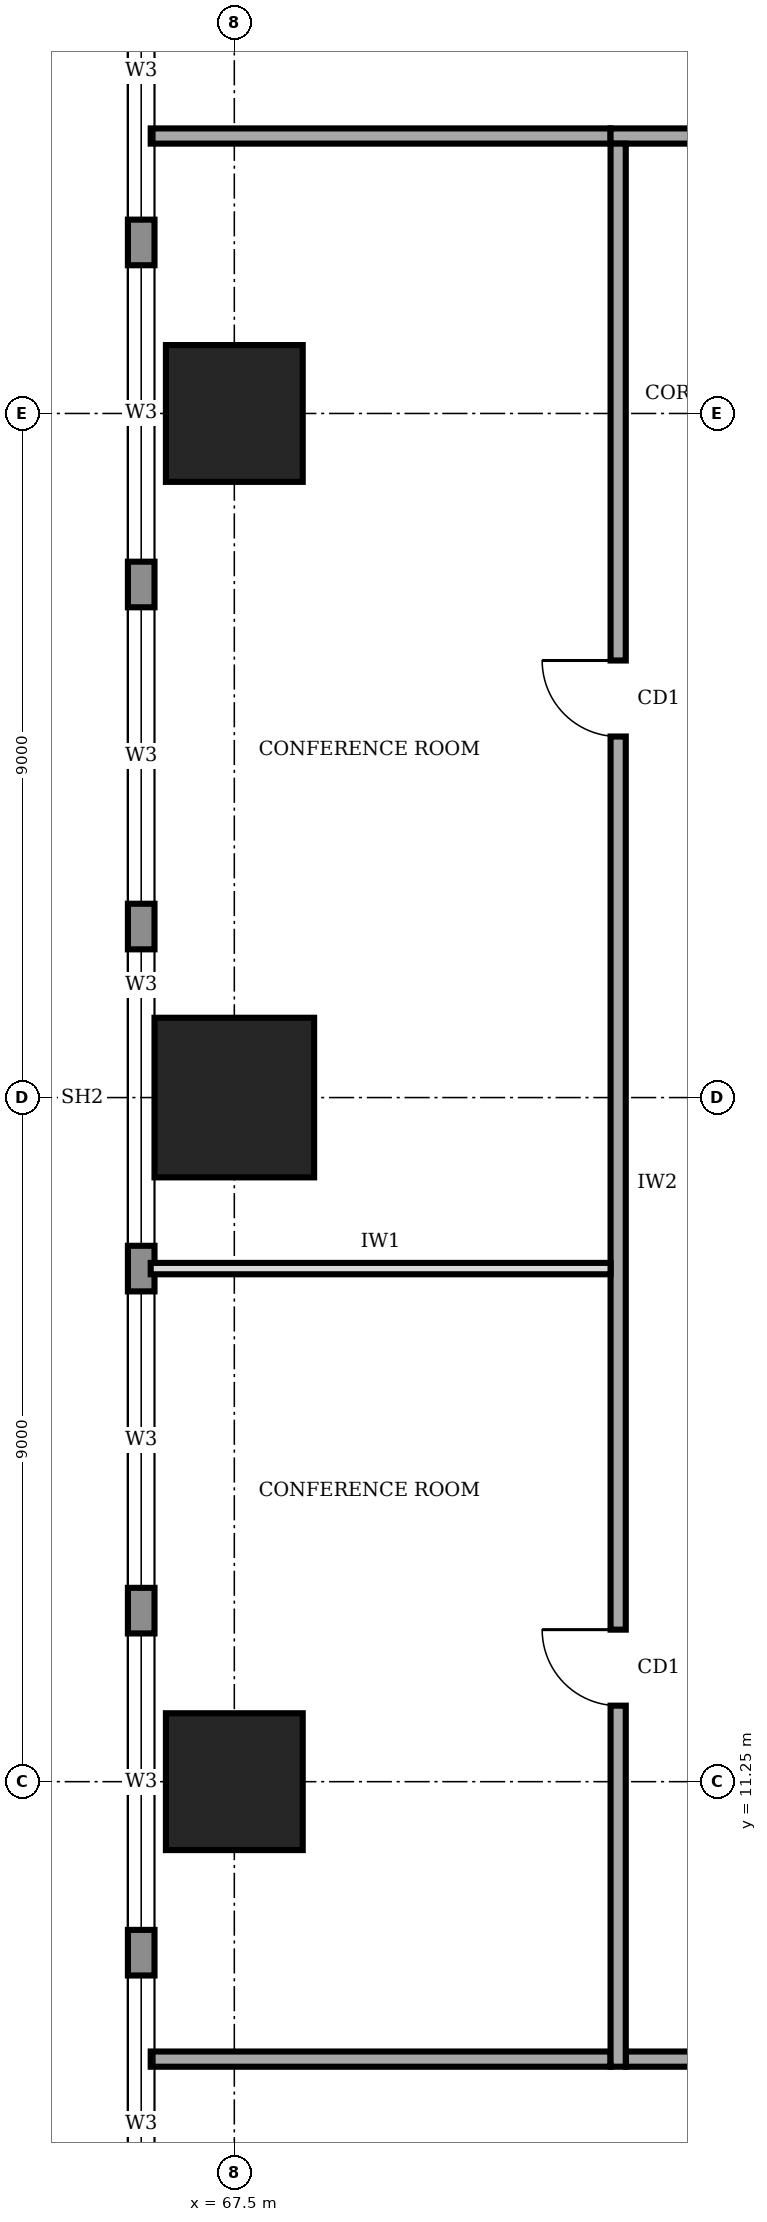
"""IFC4 building model, lengths in metres.
Left out: names, types, materials, properties, quantities, classifications, styles, units other than length and angle.
Written with IfcOpenShell. Run it as: python <this file> out.ifc"""

import sys

from ifc_helpers import new_model, si_unit, direction, frame, frame_2d, origin, origin_2d, place, context, subcontext, project, spatial, rectangle, extrude, element, fill, save


model = new_model("IFC4")
c1 = context("Model", 3, precision=1e-05, world=origin(), true_north=direction((0.0, 1.0)))
c2 = subcontext(c1, "Body", "Model", "MODEL_VIEW")
j1 = project(units=[si_unit("LENGTHUNIT", "METRE"), si_unit("PLANEANGLEUNIT", "RADIAN")], contexts=[c1])
p1 = place(None, origin())
s1 = spatial("IfcSite", under=j1, at=p1, CompositionType="ELEMENT")
p2 = place(p1, origin())
s2 = spatial("IfcBuilding", under=s1, at=p2, CompositionType="ELEMENT")
p3 = place(p2, frame((0.0, 0.0, 189.0)))
s3 = spatial("IfcBuildingStorey", under=s2, at=p3, CompositionType="ELEMENT", Elevation=189.0)
p4 = place(p3, frame((67.5, 11.25, 0.0), z_axis=(0.0, 0.0, 1.0), x_axis=(1.0, 0.0, 0.0)))
e1 = element("IfcColumn", 1, at=p4, inside=s3, PredefinedType="COLUMN", context=c2, shape_type="SweptSolid", body=[
    extrude(rectangle(XDim=1.8, YDim=1.8, at=origin_2d()), origin(), (0.0, 0.0, 1.0), 4.0),
])
p5 = place(p3, frame((67.5, 20.25, 0.0), z_axis=(0.0, 0.0, 1.0), x_axis=(1.0, 0.0, 0.0)))
e2 = element("IfcColumn", 2, at=p5, inside=s3, PredefinedType="COLUMN", context=c2, shape_type="SweptSolid", body=[
    extrude(rectangle(XDim=2.1, YDim=2.1, at=origin_2d()), origin(), (0.0, 0.0, 1.0), 4.0),
])
p6 = place(p3, frame((67.5, 29.25, 0.0), z_axis=(0.0, 0.0, 1.0), x_axis=(1.0, 0.0, 0.0)))
e3 = element("IfcColumn", 3, at=p6, inside=s3, PredefinedType="COLUMN", context=c2, shape_type="SweptSolid", body=[
    extrude(rectangle(XDim=1.8, YDim=1.8, at=origin_2d()), origin(), (0.0, 0.0, 1.0), 4.0),
])
p7 = place(p3, frame((66.275, 37.18, 0.0), z_axis=(0.0, 0.0, 1.0), x_axis=(0.0, -1.0, 0.0)))
e4 = element("IfcWall", 4, at=p7, inside=s3, PredefinedType="STANDARD", context=c2, shape_type="SweptSolid", body=[
    extrude(rectangle(XDim=33.86, YDim=0.35, at=frame_2d((16.93, 0.0))), origin(), (0.0, 0.0, 1.0), 3.75),
])
p8 = place(p7, frame((28.48, 0.0, 0.95)))
e5 = element("IfcOpeningElement", 5, at=p8, cuts=e4, PredefinedType="OPENING", context=c2, shape_type="SweptSolid", body=[
    extrude(rectangle(XDim=3.9, YDim=1.8, at=frame_2d((1.95, 0.9))), frame((0.0, 0.185, 0.0), z_axis=(0.0, -1.0, 0.0), x_axis=(1.0, 0.0, 0.0)), (0.0, 0.0, 1.0), 0.37),
])
p9 = place(p7, frame((23.98, 0.0, 0.95)))
e6 = element("IfcOpeningElement", 6, at=p9, cuts=e4, PredefinedType="OPENING", context=c2, shape_type="SweptSolid", body=[
    extrude(rectangle(XDim=3.9, YDim=1.8, at=frame_2d((1.95, 0.9))), frame((0.0, 0.185, 0.0), z_axis=(0.0, -1.0, 0.0), x_axis=(1.0, 0.0, 0.0)), (0.0, 0.0, 1.0), 0.37),
])
p10 = place(p7, frame((19.48, 0.0, 0.95)))
e7 = element("IfcOpeningElement", 7, at=p10, cuts=e4, PredefinedType="OPENING", context=c2, shape_type="SweptSolid", body=[
    extrude(rectangle(XDim=3.9, YDim=1.8, at=frame_2d((1.95, 0.9))), frame((0.0, 0.185, 0.0), z_axis=(0.0, -1.0, 0.0), x_axis=(1.0, 0.0, 0.0)), (0.0, 0.0, 1.0), 0.37),
])
p11 = place(p7, frame((14.98, 0.0, 0.95)))
e8 = element("IfcOpeningElement", 8, at=p11, cuts=e4, PredefinedType="OPENING", context=c2, shape_type="SweptSolid", body=[
    extrude(rectangle(XDim=3.9, YDim=1.8, at=frame_2d((1.95, 0.9))), frame((0.0, 0.185, 0.0), z_axis=(0.0, -1.0, 0.0), x_axis=(1.0, 0.0, 0.0)), (0.0, 0.0, 1.0), 0.37),
])
p12 = place(p7, frame((10.48, 0.0, 0.95)))
e9 = element("IfcOpeningElement", 9, at=p12, cuts=e4, PredefinedType="OPENING", context=c2, shape_type="SweptSolid", body=[
    extrude(rectangle(XDim=3.9, YDim=1.8, at=frame_2d((1.95, 0.9))), frame((0.0, 0.185, 0.0), z_axis=(0.0, -1.0, 0.0), x_axis=(1.0, 0.0, 0.0)), (0.0, 0.0, 1.0), 0.37),
])
p13 = place(p7, frame((5.98, 0.0, 0.95)))
e10 = element("IfcOpeningElement", 10, at=p13, cuts=e4, PredefinedType="OPENING", context=c2, shape_type="SweptSolid", body=[
    extrude(rectangle(XDim=3.9, YDim=1.8, at=frame_2d((1.95, 0.9))), frame((0.0, 0.185, 0.0), z_axis=(0.0, -1.0, 0.0), x_axis=(1.0, 0.0, 0.0)), (0.0, 0.0, 1.0), 0.37),
])
p14 = place(p7, frame((1.48, 0.0, 0.95)))
e11 = element("IfcOpeningElement", 11, at=p14, cuts=e4, PredefinedType="OPENING", context=c2, shape_type="SweptSolid", body=[
    extrude(rectangle(XDim=3.9, YDim=1.8, at=frame_2d((1.95, 0.9))), frame((0.0, 0.185, 0.0), z_axis=(0.0, -1.0, 0.0), x_axis=(1.0, 0.0, 0.0)), (0.0, 0.0, 1.0), 0.37),
])
p15 = place(p3, frame((72.65, 7.6, 0.0), z_axis=(0.0, 0.0, 1.0), x_axis=(1.0, 0.0, 0.0)))
e12 = element("IfcWall", 12, at=p15, inside=s3, PredefinedType="SOLIDWALL", context=c2, shape_type="SweptSolid", body=[
    extrude(rectangle(XDim=16.9, YDim=0.2, at=frame_2d((8.45, 0.0))), origin(), (0.0, 0.0, 1.0), 3.75),
])
p16 = place(p15, frame((3.575, 0.0, 0.0)))
e13 = element("IfcOpeningElement", 13, at=p16, cuts=e12, PredefinedType="OPENING", context=c2, shape_type="SweptSolid", body=[
    extrude(rectangle(XDim=1.0, YDim=2.1, at=frame_2d((0.5, 1.05))), frame((0.0, 0.11, 0.0), z_axis=(0.0, -1.0, 0.0), x_axis=(1.0, 0.0, 0.0)), (0.0, 0.0, 1.0), 0.22),
])
p17 = place(p3, frame((89.35, 32.9, 0.0), z_axis=(0.0, 0.0, 1.0), x_axis=(-1.0, 0.0, 0.0)))
e14 = element("IfcWall", 14, at=p17, inside=s3, PredefinedType="SOLIDWALL", context=c2, shape_type="SweptSolid", body=[
    extrude(rectangle(XDim=16.9, YDim=0.2, at=frame_2d((8.45, 0.0))), origin(), (0.0, 0.0, 1.0), 3.75),
])
p18 = place(p17, frame((14.375, 0.0, 0.0)))
e15 = element("IfcOpeningElement", 15, at=p18, cuts=e14, PredefinedType="OPENING", context=c2, shape_type="SweptSolid", body=[
    extrude(rectangle(XDim=1.0, YDim=2.1, at=frame_2d((0.5, 1.05))), frame((0.0, 0.11, 0.0), z_axis=(0.0, -1.0, 0.0), x_axis=(1.0, 0.0, 0.0)), (0.0, 0.0, 1.0), 0.22),
])
p19 = place(p3, frame((72.55, 32.8, 0.0), z_axis=(0.0, 0.0, 1.0), x_axis=(0.0, -1.0, 0.0)))
e16 = element("IfcWall", 16, at=p19, inside=s3, PredefinedType="SOLIDWALL", context=c2, shape_type="SweptSolid", body=[
    extrude(rectangle(XDim=25.3, YDim=0.2, at=frame_2d((12.65, 0.0))), origin(), (0.0, 0.0, 1.0), 3.75),
])
p20 = place(p19, frame((19.55, 0.0, 0.0)))
e17 = element("IfcOpeningElement", 17, at=p20, cuts=e16, PredefinedType="OPENING", context=c2, shape_type="SweptSolid", body=[
    extrude(rectangle(XDim=1.0, YDim=2.1, at=frame_2d((0.5, 1.05))), frame((0.0, 0.11, 0.0), z_axis=(0.0, -1.0, 0.0), x_axis=(1.0, 0.0, 0.0)), (0.0, 0.0, 1.0), 0.22),
])
p21 = place(p19, frame((6.8, 0.0, 0.0)))
e18 = element("IfcOpeningElement", 18, at=p21, cuts=e16, PredefinedType="OPENING", context=c2, shape_type="SweptSolid", body=[
    extrude(rectangle(XDim=1.0, YDim=2.1, at=frame_2d((0.5, 1.05))), frame((0.0, 0.11, 0.0), z_axis=(0.0, -1.0, 0.0), x_axis=(1.0, 0.0, 0.0)), (0.0, 0.0, 1.0), 0.22),
])
for number, where, z_axis, x_axis in (
    (19, (66.4, 7.6, 0.0), (0.0, 0.0, 1.0), (1.0, 0.0, 0.0)),
    (20, (66.4, 32.9, 0.0), (0.0, 0.0, 1.0), (1.0, 0.0, 0.0)),
):
    element("IfcWall", number, at=place(p3, frame(where, z_axis=z_axis, x_axis=x_axis)), inside=s3, PredefinedType="SOLIDWALL", context=c2, shape_type="SweptSolid", body=[
        extrude(rectangle(XDim=6.05, YDim=0.2, at=frame_2d((3.025, 0.0))), origin(), (0.0, 0.0, 1.0), 3.75),
    ])
p22 = place(p3, frame((66.4, 18.0, 0.0), z_axis=(0.0, 0.0, 1.0), x_axis=(1.0, 0.0, 0.0)))
e21 = element("IfcWall", 21, at=p22, inside=s3, PredefinedType="PARTITIONING", context=c2, shape_type="SweptSolid", body=[
    extrude(rectangle(XDim=6.05, YDim=0.15, at=frame_2d((3.025, 0.0))), origin(), (0.0, 0.0, 1.0), 3.75),
])
p23 = place(p8, origin())
e22 = element("IfcWindow", 22, at=p23, inside=s3, PartitioningType="SINGLE_PANEL", PredefinedType="WINDOW", context=c2, shape_type="SweptSolid", body=[
    extrude(rectangle(XDim=3.9, YDim=1.8, at=frame_2d((1.95, 0.9))), frame((0.0, 0.03, 0.0), z_axis=(0.0, -1.0, 0.0), x_axis=(1.0, 0.0, 0.0)), (0.0, 0.0, 1.0), 0.06),
])
fill(e5, e22)
p24 = place(p9, origin())
e23 = element("IfcWindow", 23, at=p24, inside=s3, PartitioningType="SINGLE_PANEL", PredefinedType="WINDOW", context=c2, shape_type="SweptSolid", body=[
    extrude(rectangle(XDim=3.9, YDim=1.8, at=frame_2d((1.95, 0.9))), frame((0.0, 0.03, 0.0), z_axis=(0.0, -1.0, 0.0), x_axis=(1.0, 0.0, 0.0)), (0.0, 0.0, 1.0), 0.06),
])
fill(e6, e23)
p25 = place(p10, origin())
e24 = element("IfcWindow", 24, at=p25, inside=s3, PartitioningType="SINGLE_PANEL", PredefinedType="WINDOW", context=c2, shape_type="SweptSolid", body=[
    extrude(rectangle(XDim=3.9, YDim=1.8, at=frame_2d((1.95, 0.9))), frame((0.0, 0.03, 0.0), z_axis=(0.0, -1.0, 0.0), x_axis=(1.0, 0.0, 0.0)), (0.0, 0.0, 1.0), 0.06),
])
fill(e7, e24)
p26 = place(p11, origin())
e25 = element("IfcWindow", 25, at=p26, inside=s3, PartitioningType="SINGLE_PANEL", PredefinedType="WINDOW", context=c2, shape_type="SweptSolid", body=[
    extrude(rectangle(XDim=3.9, YDim=1.8, at=frame_2d((1.95, 0.9))), frame((0.0, 0.03, 0.0), z_axis=(0.0, -1.0, 0.0), x_axis=(1.0, 0.0, 0.0)), (0.0, 0.0, 1.0), 0.06),
])
fill(e8, e25)
p27 = place(p12, origin())
e26 = element("IfcWindow", 26, at=p27, inside=s3, PartitioningType="SINGLE_PANEL", PredefinedType="WINDOW", context=c2, shape_type="SweptSolid", body=[
    extrude(rectangle(XDim=3.9, YDim=1.8, at=frame_2d((1.95, 0.9))), frame((0.0, 0.03, 0.0), z_axis=(0.0, -1.0, 0.0), x_axis=(1.0, 0.0, 0.0)), (0.0, 0.0, 1.0), 0.06),
])
fill(e9, e26)
p28 = place(p13, origin())
e27 = element("IfcWindow", 27, at=p28, inside=s3, PartitioningType="SINGLE_PANEL", PredefinedType="WINDOW", context=c2, shape_type="SweptSolid", body=[
    extrude(rectangle(XDim=3.9, YDim=1.8, at=frame_2d((1.95, 0.9))), frame((0.0, 0.03, 0.0), z_axis=(0.0, -1.0, 0.0), x_axis=(1.0, 0.0, 0.0)), (0.0, 0.0, 1.0), 0.06),
])
fill(e10, e27)
p29 = place(p14, origin())
e28 = element("IfcWindow", 28, at=p29, inside=s3, PartitioningType="SINGLE_PANEL", PredefinedType="WINDOW", context=c2, shape_type="SweptSolid", body=[
    extrude(rectangle(XDim=3.9, YDim=1.8, at=frame_2d((1.95, 0.9))), frame((0.0, 0.03, 0.0), z_axis=(0.0, -1.0, 0.0), x_axis=(1.0, 0.0, 0.0)), (0.0, 0.0, 1.0), 0.06),
])
fill(e11, e28)
p30 = place(p20, frame((1.0, 0.0, 0.0), z_axis=(0.0, 0.0, 1.0), x_axis=(-1.0, 0.0, 0.0)))
e29 = element("IfcDoor", 29, at=p30, inside=s3, OperationType="SINGLE_SWING_RIGHT", PredefinedType="DOOR", context=c2, shape_type="SweptSolid", body=[
    extrude(rectangle(XDim=1.0, YDim=2.1, at=frame_2d((0.5, 1.05))), frame((0.0, 0.025, 0.0), z_axis=(0.0, -1.0, 0.0), x_axis=(1.0, 0.0, 0.0)), (0.0, 0.0, 1.0), 0.05),
])
fill(e17, e29)
p31 = place(p21, frame((1.0, 0.0, 0.0), z_axis=(0.0, 0.0, 1.0), x_axis=(-1.0, 0.0, 0.0)))
e30 = element("IfcDoor", 30, at=p31, inside=s3, OperationType="SINGLE_SWING_RIGHT", PredefinedType="DOOR", context=c2, shape_type="SweptSolid", body=[
    extrude(rectangle(XDim=1.0, YDim=2.1, at=frame_2d((0.5, 1.05))), frame((0.0, 0.025, 0.0), z_axis=(0.0, -1.0, 0.0), x_axis=(1.0, 0.0, 0.0)), (0.0, 0.0, 1.0), 0.05),
])
fill(e18, e30)
save(model, sys.argv[1])
